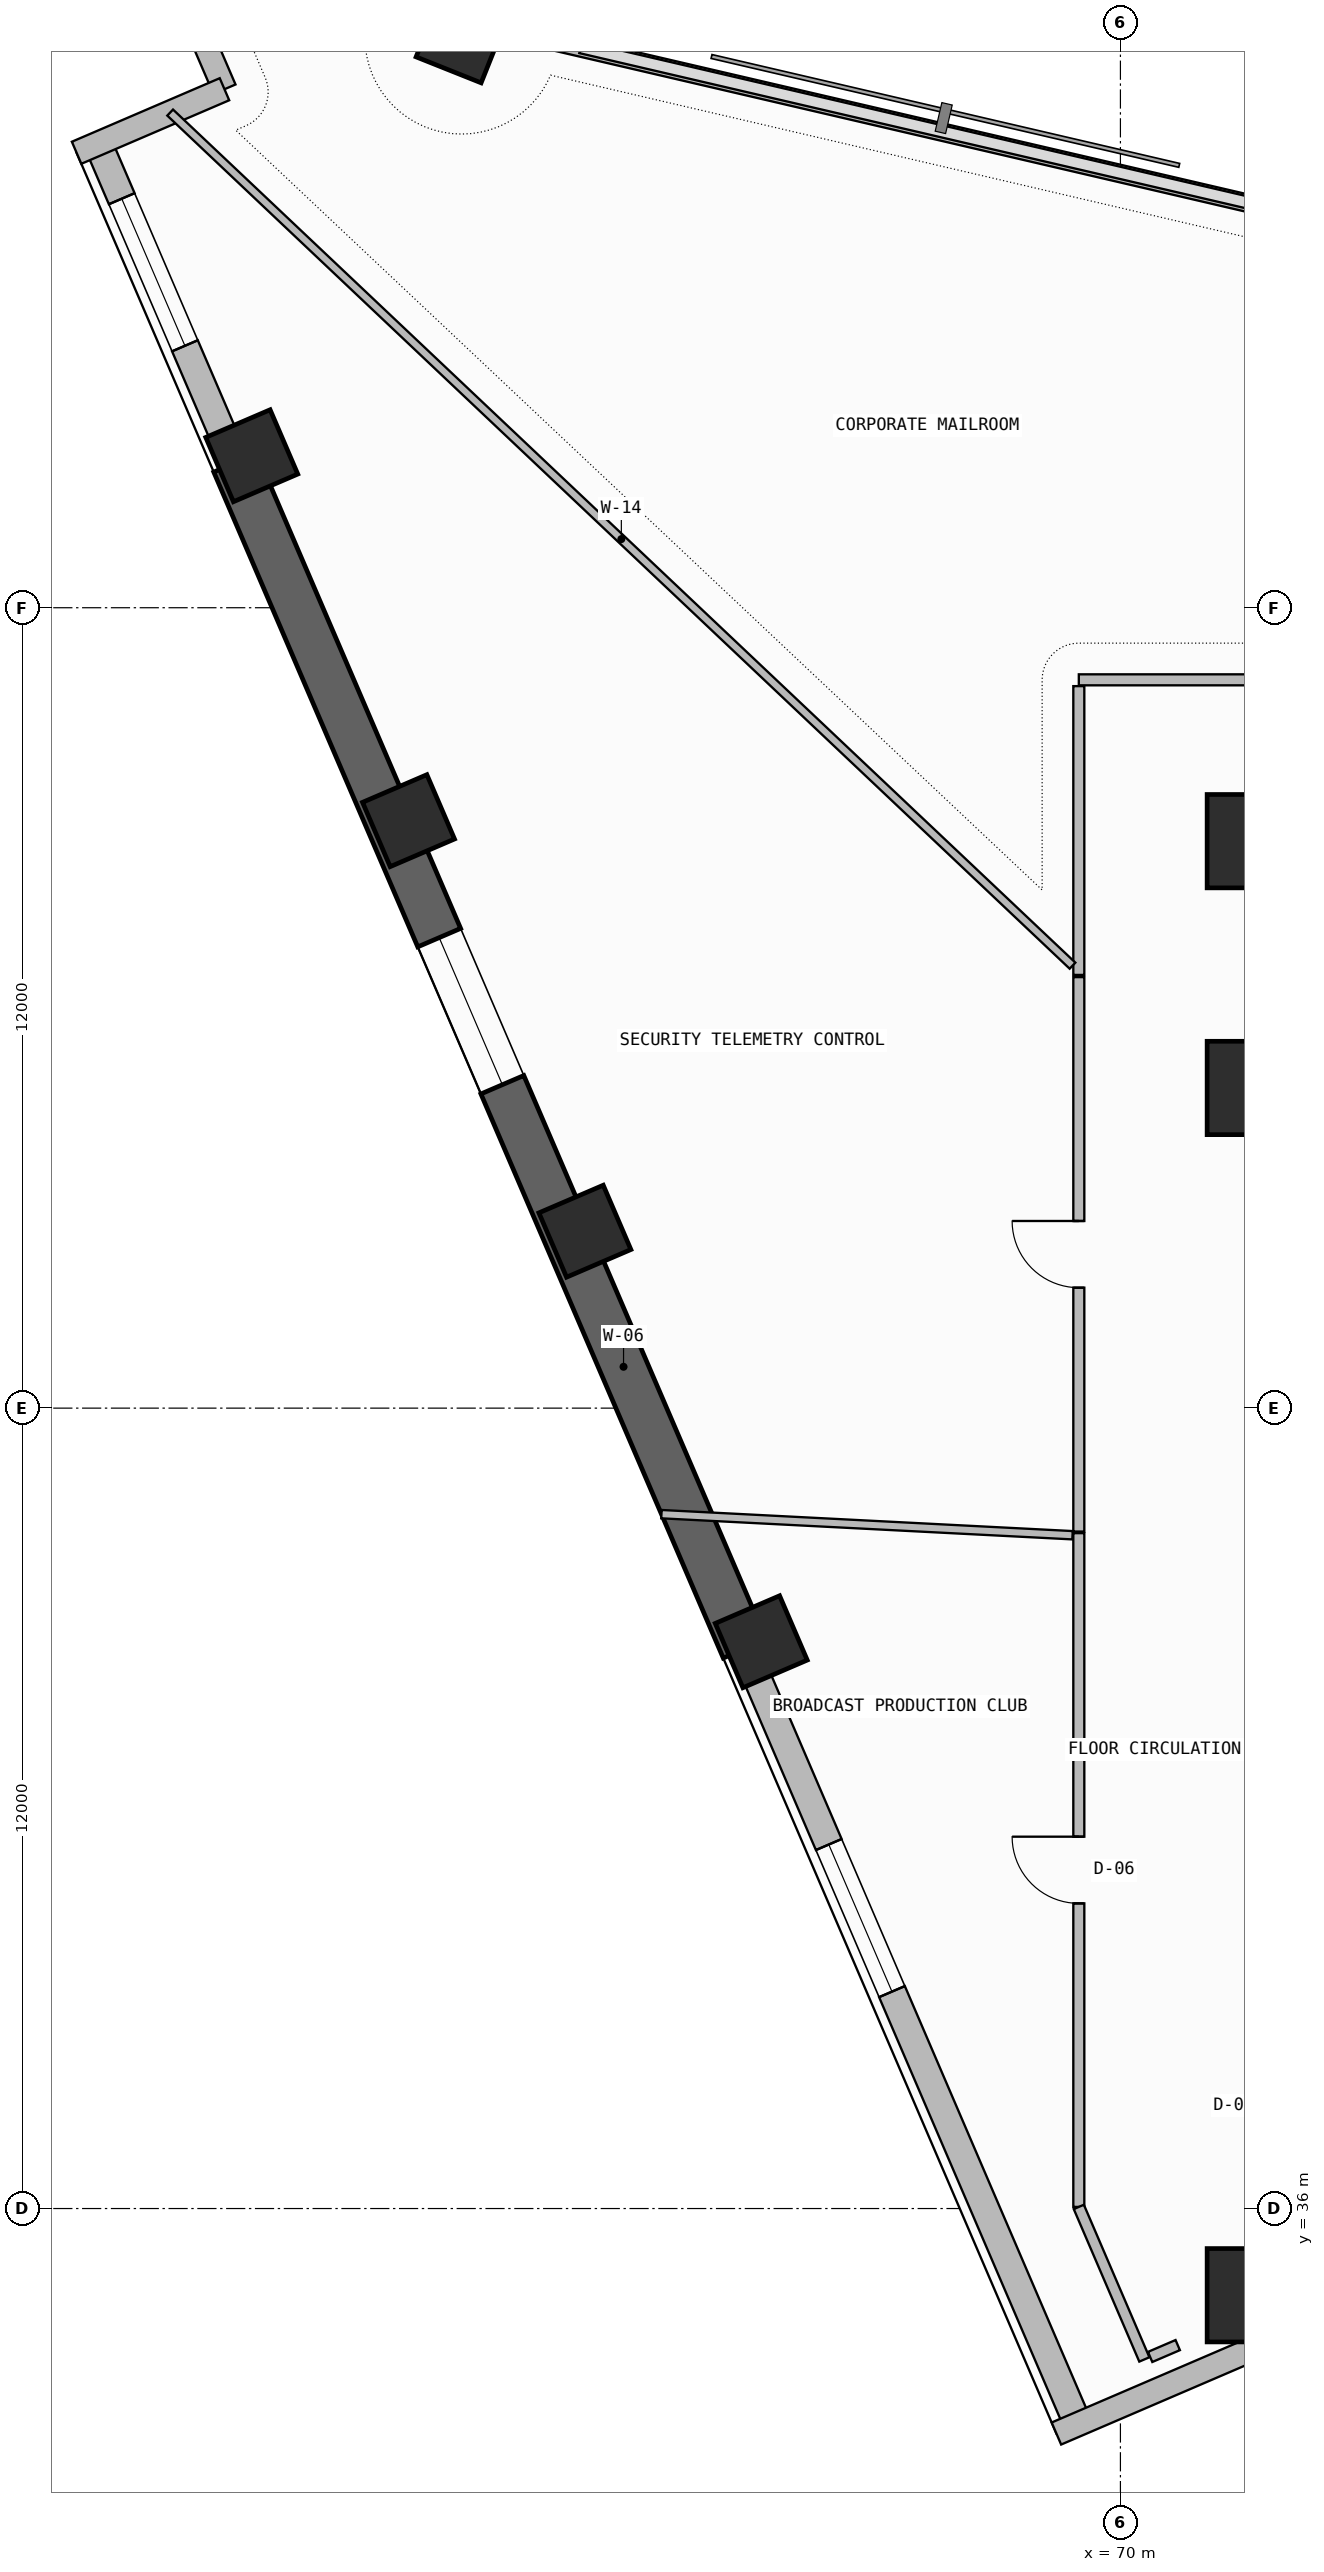
"""IFC4 building model, lengths in metres.
Left out: names, types, materials, properties, quantities, classifications, styles, units other than length and angle.
Written with IfcOpenShell. Run it as: python <this file> out.ifc"""

import sys

from ifc_helpers import new_model, si_unit, direction, frame, frame_2d, origin, origin_2d, place, context, subcontext, project, spatial, rectangle, extrude, element, fill, save


model = new_model("IFC4")
c1 = context("Model", 3, precision=1e-05, world=origin(), true_north=direction((0.0, 1.0)))
c2 = subcontext(c1, "Body", "Model", "MODEL_VIEW")
j1 = project(units=[si_unit("LENGTHUNIT", "METRE"), si_unit("PLANEANGLEUNIT", "RADIAN")], contexts=[c1])
p1 = place(None, origin())
s1 = spatial("IfcSite", under=j1, at=p1, CompositionType="ELEMENT")
p2 = place(p1, origin())
s2 = spatial("IfcBuilding", under=s1, at=p2, CompositionType="ELEMENT")
p3 = place(p2, frame((0.0, 0.0, 186.14)))
s3 = spatial("IfcBuildingStorey", under=s2, at=p3, CompositionType="ELEMENT", Elevation=186.14)
for number, where, z_axis, x_axis in (
    (1, (72.0, 34.7, 0.0), (0.0, 0.0, 1.0), (1.0, 0.0, 0.0)),
    (2, (72.0, 52.8, 0.0), (0.0, 0.0, 1.0), (1.0, 0.0, 0.0)),
    (3, (72.0, 56.5, 0.0), (0.0, 0.0, 1.0), (1.0, 0.0, 0.0)),
):
    element("IfcColumn", number, at=place(p3, frame(where, z_axis=z_axis, x_axis=x_axis)), inside=s3, PredefinedType="COLUMN", context=c2, shape_type="SweptSolid", body=[
        extrude(rectangle(XDim=1.4, YDim=1.4, at=origin_2d()), origin(), (0.0, 0.0, 1.0), 3.52),
    ])
for number, where, z_axis, x_axis in (
    (4, (60.122, 68.551, 0.0), (0.0, 0.0, 1.0), (0.371, 0.929, 0.0)),
    (5, (56.976, 62.279, 0.0), (0.0, 0.0, 1.0), (-0.395, 0.919, 0.0)),
    (6, (59.326, 56.807, 0.0), (0.0, 0.0, 1.0), (-0.395, 0.919, 0.0)),
    (7, (61.97, 50.653, 0.0), (0.0, 0.0, 1.0), (-0.395, 0.919, 0.0)),
    (8, (64.615, 44.498, 0.0), (0.0, 0.0, 1.0), (-0.395, 0.919, 0.0)),
):
    element("IfcColumn", number, at=place(p3, frame(where, z_axis=z_axis, x_axis=x_axis)), inside=s3, PredefinedType="COLUMN", context=c2, shape_type="SweptSolid", body=[
        extrude(rectangle(XDim=1.05, YDim=1.05, at=origin_2d()), origin(), (0.0, 0.0, 1.0), 3.52),
    ])
p4 = place(p3, frame((54.671, 66.959, 0.0), z_axis=(0.0, 0.0, 1.0), x_axis=(0.394733507229, -0.918795656428, 0.0)))
e9 = element("IfcWall", 9, at=p4, inside=s3, PredefinedType="SOLIDWALL", context=c2, shape_type="SweptSolid", body=[
    extrude(rectangle(XDim=5.21, YDim=0.42, at=frame_2d((2.605, 0.0))), origin(), (0.0, 0.0, 1.0), 2.645),
])
p5 = place(p4, frame((0.9, 0.0, 1.2)))
e10 = element("IfcOpeningElement", 10, at=p5, cuts=e9, PredefinedType="OPENING", context=c2, shape_type="SweptSolid", body=[
    extrude(rectangle(XDim=2.4, YDim=0.9, at=frame_2d((1.2, 0.45))), frame((0.0, 0.22, 0.0), z_axis=(0.0, -1.0, 0.0), x_axis=(1.0, 0.0, 0.0)), (0.0, 0.0, 1.0), 0.44),
])
p6 = place(p3, frame((56.728, 62.172, -0.26), z_axis=(0.0, 0.0, 1.0), x_axis=(0.394736752992, -0.918794261974, 0.0)))
e11 = element("IfcWall", 11, at=p6, inside=s3, PredefinedType="SHEAR", context=c2, shape_type="SweptSolid", body=[
    extrude(rectangle(XDim=19.353, YDim=0.7, at=frame_2d((9.676, 0.0))), origin(), (0.0, 0.0, 1.0), 3.52),
])
p7 = place(p6, frame((7.747, 0.0, 1.2)))
e12 = element("IfcOpeningElement", 12, at=p7, cuts=e11, PredefinedType="OPENING", context=c2, shape_type="SweptSolid", body=[
    extrude(rectangle(XDim=2.4, YDim=0.9, at=frame_2d((1.2, 0.45))), frame((0.0, 0.36, 0.0), z_axis=(0.0, -1.0, 0.0), x_axis=(1.0, 0.0, 0.0)), (0.0, 0.0, 1.0), 0.72),
])
p8 = place(p3, frame((64.367, 44.391, 0.0), z_axis=(0.0, 0.0, 1.0), x_axis=(0.394757430431, -0.918785378159, 0.0)))
e13 = element("IfcWall", 13, at=p8, inside=s3, PredefinedType="SOLIDWALL", context=c2, shape_type="SweptSolid", body=[
    extrude(rectangle(XDim=12.654, YDim=0.42, at=frame_2d((6.327, 0.0))), origin(), (0.0, 0.0, 1.0), 2.645),
])
p9 = place(p8, frame((3.193, 0.0, 1.2)))
e14 = element("IfcOpeningElement", 14, at=p9, cuts=e13, PredefinedType="OPENING", context=c2, shape_type="SweptSolid", body=[
    extrude(rectangle(XDim=2.4, YDim=0.9, at=frame_2d((1.2, 0.45))), frame((0.0, 0.22, 0.0), z_axis=(0.0, -1.0, 0.0), x_axis=(1.0, 0.0, 0.0)), (0.0, 0.0, 1.0), 0.44),
])
p10 = place(p3, frame((55.614, 69.991, 0.0), z_axis=(0.0, 0.0, 1.0), x_axis=(0.394663989422, -0.918825519592, 0.0)))
e15 = element("IfcWall", 15, at=p10, inside=s3, PredefinedType="SOLIDWALL", context=c2, shape_type="SweptSolid", body=[
    extrude(rectangle(XDim=2.413, YDim=0.36, at=frame_2d((1.207, 0.0))), origin(), (0.0, 0.0, 1.0), 3.26),
])
p11 = place(p10, frame((0.34, 0.0, 0.45)))
e16 = element("IfcOpeningElement", 16, at=p11, cuts=e15, PredefinedType="OPENING", context=c2, shape_type="SweptSolid", body=[
    extrude(rectangle(XDim=1.3, YDim=2.4, at=frame_2d((0.65, 1.2))), frame((0.0, 0.19, 0.0), z_axis=(0.0, -1.0, 0.0), x_axis=(1.0, 0.0, 0.0)), (0.0, 0.0, 1.0), 0.38),
])
p12 = place(p3, frame((56.566, 67.773, 0.0), z_axis=(0.0, 0.0, 1.0), x_axis=(-0.918788830096, -0.394749396062, 0.0)))
e17 = element("IfcWall", 17, at=p12, inside=s3, PredefinedType="SOLIDWALL", context=c2, shape_type="SweptSolid", body=[
    extrude(rectangle(XDim=2.413, YDim=0.36, at=frame_2d((1.207, 0.0))), origin(), (0.0, 0.0, 1.0), 3.26),
])
p13 = place(p3, frame((69.04, 32.627, 0.0), z_axis=(0.0, 0.0, 1.0), x_axis=(0.91879775808, 0.394728615312, 0.0)))
e18 = element("IfcWall", 18, at=p13, inside=s3, PredefinedType="SOLIDWALL", context=c2, shape_type="SweptSolid", body=[
    extrude(rectangle(XDim=3.713, YDim=0.36, at=frame_2d((1.856, 0.0))), origin(), (0.0, 0.0, 1.0), 3.26),
])
p14 = place(p3, frame((87.165, 62.482, 0.0), z_axis=(0.0, 0.0, 1.0), x_axis=(-0.973958631559, 0.226725790352, 0.0)))
e19 = element("IfcWall", 19, at=p14, inside=s3, PredefinedType="PARAPET", context=c2, shape_type="SweptSolid", body=[
    extrude(rectangle(XDim=27.376, YDim=0.2, at=frame_2d((13.688, 0.0))), origin(), (0.0, 0.0, 1.0), 1.15),
])
p15 = place(p3, frame((69.376, 46.125, 0.0), z_axis=(0.0, 0.0, 1.0), x_axis=(0.0, -1.0, 0.0)))
e20 = element("IfcWall", 20, at=p15, inside=s3, PredefinedType="PARTITIONING", context=c2, shape_type="SweptSolid", body=[
    extrude(rectangle(XDim=10.101, YDim=0.165, at=frame_2d((5.051, 0.0))), origin(), (0.0, 0.0, 1.0), 3.26),
])
p16 = place(p15, frame((4.551, 0.0, 0.0)))
e21 = element("IfcOpeningElement", 21, at=p16, cuts=e20, PredefinedType="OPENING", context=c2, shape_type="SweptSolid", body=[
    extrude(rectangle(XDim=1.0, YDim=2.2, at=frame_2d((0.5, 1.1))), frame((0.0, 0.093, 0.0), z_axis=(0.0, -1.0, 0.0), x_axis=(1.0, 0.0, 0.0)), (0.0, 0.0, 1.0), 0.185),
])
p17 = place(p3, frame((69.376, 36.024, 0.0), z_axis=(0.0, 0.0, 1.0), x_axis=(0.394712324254, -0.91880475678, 0.0)))
e22 = element("IfcWall", 22, at=p17, inside=s3, PredefinedType="PARTITIONING", context=c2, shape_type="SweptSolid", body=[
    extrude(rectangle(XDim=2.489, YDim=0.165, at=frame_2d((1.245, 0.0))), origin(), (0.0, 0.0, 1.0), 3.26),
])
p18 = place(p3, frame((70.446, 33.775, 0.0), z_axis=(0.0, 0.0, 1.0), x_axis=(0.918836319852, 0.394638844161, 0.0)))
e23 = element("IfcWall", 23, at=p18, inside=s3, PredefinedType="PARTITIONING", context=c2, shape_type="SweptSolid", body=[
    extrude(rectangle(XDim=0.45, YDim=0.165, at=frame_2d((0.225, 0.0))), origin(), (0.0, 0.0, 1.0), 3.26),
])
p19 = place(p3, frame((63.118, 46.41, 0.0), z_axis=(0.0, 0.0, 1.0), x_axis=(0.998689012004, -0.051188448924, 0.0)))
e24 = element("IfcWall", 24, at=p19, inside=s3, PredefinedType="PARTITIONING", context=c2, shape_type="SweptSolid", body=[
    extrude(rectangle(XDim=6.172, YDim=0.125, at=frame_2d((3.086, 0.0))), origin(), (0.0, 0.0, 1.0), 2.645),
])
p20 = place(p3, frame((75.524, 58.919, 0.0), z_axis=(0.0, 0.0, 1.0), x_axis=(-1.0, 0.0, 0.0)))
e25 = element("IfcWall", 25, at=p20, inside=s3, PredefinedType="PARTITIONING", context=c2, shape_type="SweptSolid", body=[
    extrude(rectangle(XDim=6.148, YDim=0.165, at=frame_2d((3.074, 0.0))), origin(), (0.0, 0.0, 1.0), 2.745),
])
p21 = place(p20, frame((1.862, 0.0, 0.0)))
e26 = element("IfcOpeningElement", 26, at=p21, cuts=e25, PredefinedType="OPENING", context=c2, shape_type="SweptSolid", body=[
    extrude(rectangle(XDim=1.0, YDim=2.2, at=frame_2d((0.5, 1.1))), frame((0.0, 0.093, 0.0), z_axis=(0.0, -1.0, 0.0), x_axis=(1.0, 0.0, 0.0)), (0.0, 0.0, 1.0), 0.185),
])
p22 = place(p3, frame((69.376, 58.824, 0.0), z_axis=(0.0, 0.0, 1.0), x_axis=(0.0, -1.0, 0.0)))
e27 = element("IfcWall", 27, at=p22, inside=s3, PredefinedType="PARTITIONING", context=c2, shape_type="SweptSolid", body=[
    extrude(rectangle(XDim=4.33, YDim=0.165, at=frame_2d((2.165, 0.0))), origin(), (0.0, 0.0, 1.0), 2.745),
])
p23 = place(p3, frame((69.282, 54.634, 0.0), z_axis=(0.0, 0.0, 1.0), x_axis=(-0.726693785238, 0.686961529125, 0.0)))
e28 = element("IfcWall", 28, at=p23, inside=s3, PredefinedType="PARTITIONING", context=c2, shape_type="SweptSolid", body=[
    extrude(rectangle(XDim=18.618, YDim=0.125, at=frame_2d((9.309, 0.0))), origin(), (0.0, 0.0, 1.0), 2.645),
])
p24 = place(p3, frame((69.376, 54.462, 0.0), z_axis=(0.0, 0.0, 1.0), x_axis=(0.0, -1.0, 0.0)))
e29 = element("IfcWall", 29, at=p24, inside=s3, PredefinedType="PARTITIONING", context=c2, shape_type="SweptSolid", body=[
    extrude(rectangle(XDim=8.312, YDim=0.165, at=frame_2d((4.156, 0.0))), origin(), (0.0, 0.0, 1.0), 2.745),
])
p25 = place(p24, frame((3.656, 0.0, 0.0)))
e30 = element("IfcOpeningElement", 30, at=p25, cuts=e29, PredefinedType="OPENING", context=c2, shape_type="SweptSolid", body=[
    extrude(rectangle(XDim=1.0, YDim=2.2, at=frame_2d((0.5, 1.1))), frame((0.0, 0.093, 0.0), z_axis=(0.0, -1.0, 0.0), x_axis=(1.0, 0.0, 0.0)), (0.0, 0.0, 1.0), 0.185),
])
p26 = place(p5, origin())
e31 = element("IfcWindow", 31, at=p26, inside=s3, PartitioningType="SINGLE_PANEL", PredefinedType="WINDOW", context=c2, shape_type="SweptSolid", body=[
    extrude(rectangle(XDim=2.4, YDim=0.9, at=frame_2d((1.2, 0.45))), frame((0.0, 0.03, 0.0), z_axis=(0.0, -1.0, 0.0), x_axis=(1.0, 0.0, 0.0)), (0.0, 0.0, 1.0), 0.06),
])
fill(e10, e31)
p27 = place(p7, origin())
e32 = element("IfcWindow", 32, at=p27, inside=s3, PartitioningType="SINGLE_PANEL", PredefinedType="WINDOW", context=c2, shape_type="SweptSolid", body=[
    extrude(rectangle(XDim=2.4, YDim=0.9, at=frame_2d((1.2, 0.45))), frame((0.0, 0.03, 0.0), z_axis=(0.0, -1.0, 0.0), x_axis=(1.0, 0.0, 0.0)), (0.0, 0.0, 1.0), 0.06),
])
fill(e12, e32)
p28 = place(p9, origin())
e33 = element("IfcWindow", 33, at=p28, inside=s3, PartitioningType="SINGLE_PANEL", PredefinedType="WINDOW", context=c2, shape_type="SweptSolid", body=[
    extrude(rectangle(XDim=2.4, YDim=0.9, at=frame_2d((1.2, 0.45))), frame((0.0, 0.03, 0.0), z_axis=(0.0, -1.0, 0.0), x_axis=(1.0, 0.0, 0.0)), (0.0, 0.0, 1.0), 0.06),
])
fill(e14, e33)
p29 = place(p16, frame((1.0, 0.0, 0.0), z_axis=(0.0, 0.0, 1.0), x_axis=(-1.0, 0.0, 0.0)))
e34 = element("IfcDoor", 34, at=p29, inside=s3, OperationType="SINGLE_SWING_RIGHT", PredefinedType="DOOR", context=c2, shape_type="SweptSolid", body=[
    extrude(rectangle(XDim=1.0, YDim=2.2, at=frame_2d((0.5, 1.1))), frame((0.0, 0.025, 0.0), z_axis=(0.0, -1.0, 0.0), x_axis=(1.0, 0.0, 0.0)), (0.0, 0.0, 1.0), 0.05),
])
fill(e21, e34)
p30 = place(p25, frame((1.0, 0.0, 0.0), z_axis=(0.0, 0.0, 1.0), x_axis=(-1.0, 0.0, 0.0)))
e35 = element("IfcDoor", 35, at=p30, inside=s3, OperationType="SINGLE_SWING_RIGHT", PredefinedType="DOOR", context=c2, shape_type="SweptSolid", body=[
    extrude(rectangle(XDim=1.0, YDim=2.2, at=frame_2d((0.5, 1.1))), frame((0.0, 0.025, 0.0), z_axis=(0.0, -1.0, 0.0), x_axis=(1.0, 0.0, 0.0)), (0.0, 0.0, 1.0), 0.05),
])
fill(e30, e35)
save(model, sys.argv[1])
